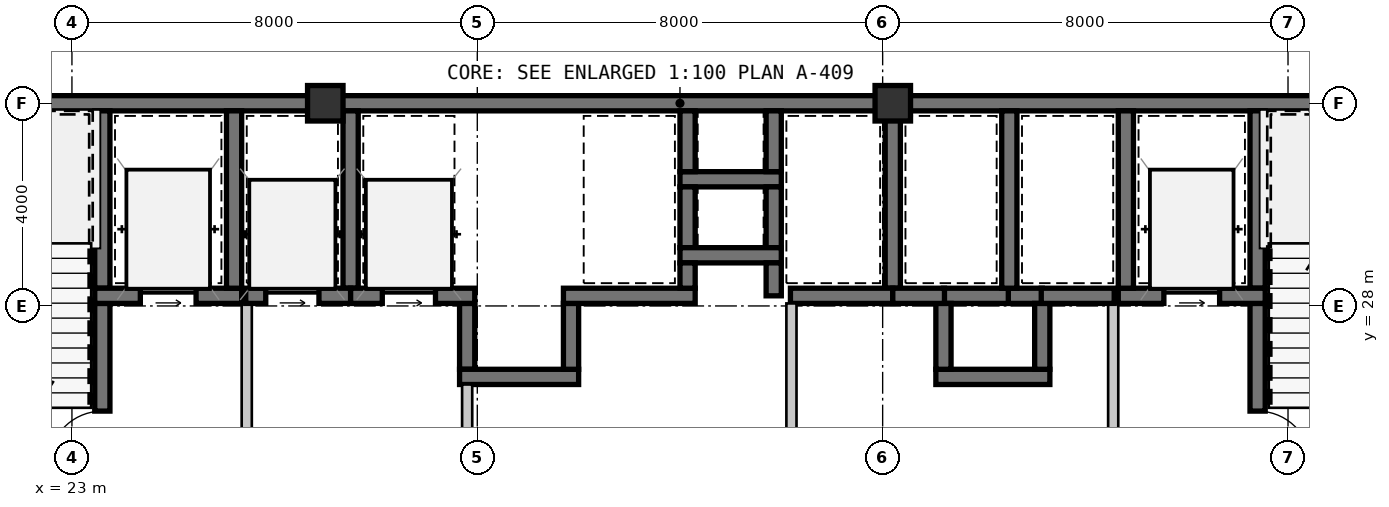
"""IFC4 building model, lengths in metres.
Left out: names, types, materials, properties, quantities, classifications, styles, units other than length and angle.
Written with IfcOpenShell. Run it as: python <this file> out.ifc"""

import sys

from ifc_helpers import new_model, si_unit, direction, frame, frame_2d, origin, origin_2d, place, context, subcontext, project, spatial, rectangle, extrude, source, transform, mapped, element, fill, save


model = new_model("IFC4")
c1 = context("Model", 3, precision=1e-05, world=origin(), true_north=direction((0.0, 1.0)))
c2 = subcontext(c1, "Body", "Model", "MODEL_VIEW")
j1 = project(units=[si_unit("LENGTHUNIT", "METRE"), si_unit("PLANEANGLEUNIT", "RADIAN")], contexts=[c1])
p1 = place(None, origin())
s1 = spatial("IfcSite", under=j1, at=p1, CompositionType="ELEMENT")
p2 = place(p1, origin())
s2 = spatial("IfcBuilding", under=s1, at=p2, CompositionType="ELEMENT")
p3 = place(p2, frame((0.0, 0.0, 68.25)))
s3 = spatial("IfcBuildingStorey", under=s2, at=p3, CompositionType="ELEMENT", Elevation=68.25)
m1 = source(origin(), c2, "Body", "SweptSolid", [
    extrude(rectangle(XDim=0.7, YDim=0.7, at=origin_2d()), origin(), (0.0, 0.0, 1.0), 3.15),
])
for number, where, z_axis, x_axis in (
    (1, (28.0, 32.0, 0.0), (0.0, 0.0, 1.0), (1.0, 0.0, 0.0)),
    (2, (39.2, 32.0, 0.0), (0.0, 0.0, 1.0), (1.0, 0.0, 0.0)),
):
    element("IfcColumn", number, at=place(p3, frame(where, z_axis=z_axis, x_axis=x_axis)), inside=s3, PredefinedType="COLUMN", context=c2, shape_type="MappedRepresentation", body=[
        mapped(m1, transform((0.0, 0.0, 0.0), scale=1.0)),
    ])
m2 = source(origin(), c2, "Body", "SweptSolid", [
    extrude(rectangle(XDim=9.15, YDim=0.3, at=frame_2d((4.575, 0.0))), origin(), (0.0, 0.0, 1.0), 2.93),
])
p4 = place(p3, frame((18.85, 32.0, 0.0), z_axis=(0.0, 0.0, 1.0), x_axis=(1.0, 0.0, 0.0)))
e3 = element("IfcWall", 3, at=p4, inside=s3, PredefinedType="SHEAR", context=c2, shape_type="MappedRepresentation", body=[
    mapped(m2, transform((0.0, 0.0, 0.0), scale=1.0)),
])
m3 = source(origin(), c2, "Body", "SweptSolid", [
    extrude(rectangle(XDim=11.2, YDim=0.3, at=frame_2d((5.6, 0.0))), origin(), (0.0, 0.0, 1.0), 2.93),
])
p5 = place(p3, frame((28.0, 32.0, 0.0), z_axis=(0.0, 0.0, 1.0), x_axis=(1.0, 0.0, 0.0)))
e4 = element("IfcWall", 4, at=p5, inside=s3, PredefinedType="SHEAR", context=c2, shape_type="MappedRepresentation", body=[
    mapped(m3, transform((0.0, 0.0, 0.0), scale=1.0)),
])
m4 = source(origin(), c2, "Body", "SweptSolid", [
    extrude(rectangle(XDim=11.95, YDim=0.3, at=frame_2d((5.975, 0.0))), origin(), (0.0, 0.0, 1.0), 2.93),
])
p6 = place(p3, frame((39.2, 32.0, 0.0), z_axis=(0.0, 0.0, 1.0), x_axis=(1.0, 0.0, 0.0)))
e5 = element("IfcWall", 5, at=p6, inside=s3, PredefinedType="SHEAR", context=c2, shape_type="MappedRepresentation", body=[
    mapped(m4, transform((0.0, 0.0, 0.0), scale=1.0)),
])
m5 = source(origin(), c2, "Body", "SweptSolid", [
    extrude(rectangle(XDim=3.5, YDim=0.3, at=frame_2d((1.75, 0.0))), origin(), (0.0, 0.0, 1.0), 2.93),
])
p7 = place(p3, frame((23.6, 28.35, 0.0), z_axis=(0.0, 0.0, 1.0), x_axis=(0.0, 1.0, 0.0)))
e6 = element("IfcWall", 6, at=p7, inside=s3, PredefinedType="SHEAR", context=c2, shape_type="MappedRepresentation", body=[
    mapped(m5, transform((0.0, 0.0, 0.0), scale=1.0)),
])
m6 = source(origin(), c2, "Body", "SweptSolid", [
    extrude(rectangle(XDim=3.9, YDim=0.3, at=frame_2d((1.95, 0.0))), origin(), (0.0, 0.0, 1.0), 2.93),
])
p8 = place(p3, frame((23.6, 24.15, 0.0), z_axis=(0.0, 0.0, 1.0), x_axis=(0.0, 1.0, 0.0)))
e7 = element("IfcWall", 7, at=p8, inside=s3, PredefinedType="SHEAR", context=c2, shape_type="MappedRepresentation", body=[
    mapped(m6, transform((0.0, 0.0, 0.0), scale=1.0)),
])
m7 = source(origin(), c2, "Body", "SweptSolid", [
    extrude(rectangle(XDim=1.05, YDim=2.1, at=frame_2d((0.525, 1.05))), frame((0.0, 0.16, 0.0), z_axis=(0.0, -1.0, 0.0), x_axis=(1.0, 0.0, 0.0)), (0.0, 0.0, 1.0), 0.32),
])
p9 = place(p8, frame((0.725, 0.0, 0.0)))
e8 = element("IfcOpeningElement", 8, at=p9, cuts=e7, PredefinedType="OPENING", context=c2, shape_type="MappedRepresentation", body=[
    mapped(m7, transform((0.0, 0.0, 0.0), scale=1.0)),
])
m8 = source(origin(), c2, "Body", "SweptSolid", [
    extrude(rectangle(XDim=2.9, YDim=0.3, at=frame_2d((1.45, 0.0))), origin(), (0.0, 0.0, 1.0), 2.93),
])
p10 = place(p3, frame((23.45, 28.2, 0.0), z_axis=(0.0, 0.0, 1.0), x_axis=(1.0, 0.0, 0.0)))
e9 = element("IfcWall", 9, at=p10, inside=s3, PredefinedType="SHEAR", context=c2, shape_type="MappedRepresentation", body=[
    mapped(m8, transform((0.0, 0.0, 0.0), scale=1.0)),
])
m9 = source(origin(), c2, "Body", "SweptSolid", [
    extrude(rectangle(XDim=1.1, YDim=2.15, at=frame_2d((0.55, 1.075))), frame((0.0, 0.16, 0.0), z_axis=(0.0, -1.0, 0.0), x_axis=(1.0, 0.0, 0.0)), (0.0, 0.0, 1.0), 0.32),
])
p11 = place(p10, frame((0.9, 0.0, 0.0)))
e10 = element("IfcOpeningElement", 10, at=p11, cuts=e9, PredefinedType="OPENING", context=c2, shape_type="MappedRepresentation", body=[
    mapped(m9, transform((0.0, 0.0, 0.0), scale=1.0)),
])
p12 = place(p3, frame((26.2, 28.35, 0.0), z_axis=(0.0, 0.0, 1.0), x_axis=(0.0, 1.0, 0.0)))
e11 = element("IfcWall", 11, at=p12, inside=s3, PredefinedType="SHEAR", context=c2, shape_type="MappedRepresentation", body=[
    mapped(m5, transform((0.0, 0.0, 0.0), scale=1.0)),
])
m10 = source(origin(), c2, "Body", "SweptSolid", [
    extrude(rectangle(XDim=3.95, YDim=0.2, at=frame_2d((1.975, 0.0))), origin(), (0.0, 0.0, 1.0), 2.93),
])
p13 = place(p3, frame((26.45, 24.1, 0.0), z_axis=(0.0, 0.0, 1.0), x_axis=(0.0, 1.0, 0.0)))
e12 = element("IfcWall", 12, at=p13, inside=s3, PredefinedType="SOLIDWALL", context=c2, shape_type="MappedRepresentation", body=[
    mapped(m10, transform((0.0, 0.0, 0.0), scale=1.0)),
])
p14 = place(p3, frame((46.4, 31.85, 0.0), z_axis=(0.0, 0.0, 1.0), x_axis=(0.0, -1.0, 0.0)))
e13 = element("IfcWall", 13, at=p14, inside=s3, PredefinedType="SHEAR", context=c2, shape_type="MappedRepresentation", body=[
    mapped(m5, transform((0.0, 0.0, 0.0), scale=1.0)),
])
p15 = place(p3, frame((46.4, 28.05, 0.0), z_axis=(0.0, 0.0, 1.0), x_axis=(0.0, -1.0, 0.0)))
e14 = element("IfcWall", 14, at=p15, inside=s3, PredefinedType="SHEAR", context=c2, shape_type="MappedRepresentation", body=[
    mapped(m6, transform((0.0, 0.0, 0.0), scale=1.0)),
])
p16 = place(p15, frame((2.125, 0.0, 0.0)))
e15 = element("IfcOpeningElement", 15, at=p16, cuts=e14, PredefinedType="OPENING", context=c2, shape_type="MappedRepresentation", body=[
    mapped(m7, transform((0.0, 0.0, 0.0), scale=1.0)),
])
p17 = place(p3, frame((43.65, 28.2, 0.0), z_axis=(0.0, 0.0, 1.0), x_axis=(1.0, 0.0, 0.0)))
e16 = element("IfcWall", 16, at=p17, inside=s3, PredefinedType="SHEAR", context=c2, shape_type="MappedRepresentation", body=[
    mapped(m8, transform((0.0, 0.0, 0.0), scale=1.0)),
])
p18 = place(p17, frame((0.9, 0.0, 0.0)))
e17 = element("IfcOpeningElement", 17, at=p18, cuts=e16, PredefinedType="OPENING", context=c2, shape_type="MappedRepresentation", body=[
    mapped(m9, transform((0.0, 0.0, 0.0), scale=1.0)),
])
p19 = place(p3, frame((43.8, 31.85, 0.0), z_axis=(0.0, 0.0, 1.0), x_axis=(0.0, -1.0, 0.0)))
e18 = element("IfcWall", 18, at=p19, inside=s3, PredefinedType="SHEAR", context=c2, shape_type="MappedRepresentation", body=[
    mapped(m5, transform((0.0, 0.0, 0.0), scale=1.0)),
])
p20 = place(p3, frame((43.55, 28.05, 0.0), z_axis=(0.0, 0.0, 1.0), x_axis=(0.0, -1.0, 0.0)))
e19 = element("IfcWall", 19, at=p20, inside=s3, PredefinedType="SOLIDWALL", context=c2, shape_type="MappedRepresentation", body=[
    mapped(m10, transform((0.0, 0.0, 0.0), scale=1.0)),
])
m11 = source(origin(), c2, "Body", "SweptSolid", [
    extrude(rectangle(XDim=2.0, YDim=0.3, at=frame_2d((1.0, 0.0))), origin(), (0.0, 0.0, 1.0), 2.93),
])
p21 = place(p3, frame((35.0, 30.5, 0.0), z_axis=(0.0, 0.0, 1.0), x_axis=(1.0, 0.0, 0.0)))
e20 = element("IfcWall", 20, at=p21, inside=s3, PredefinedType="SHEAR", context=c2, shape_type="MappedRepresentation", body=[
    mapped(m11, transform((0.0, 0.0, 0.0), scale=1.0)),
])
m12 = source(origin(), c2, "Body", "SweptSolid", [
    extrude(rectangle(XDim=1.2, YDim=0.3, at=frame_2d((0.6, 0.0))), origin(), (0.0, 0.0, 1.0), 2.93),
])
for number, where, z_axis, x_axis in (
    (21, (35.15, 31.85, 0.0), (0.0, 0.0, 1.0), (0.0, -1.0, 0.0)),
    (22, (36.85, 30.65, 0.0), (0.0, 0.0, 1.0), (0.0, 1.0, 0.0)),
    (23, (35.15, 30.35, 0.0), (0.0, 0.0, 1.0), (0.0, -1.0, 0.0)),
    (24, (36.85, 29.15, 0.0), (0.0, 0.0, 1.0), (0.0, 1.0, 0.0)),
):
    element("IfcWall", number, at=place(p3, frame(where, z_axis=z_axis, x_axis=x_axis)), inside=s3, PredefinedType="SHEAR", context=c2, shape_type="MappedRepresentation", body=[
        mapped(m12, transform((0.0, 0.0, 0.0), scale=1.0)),
    ])
p22 = place(p3, frame((35.0, 29.0, 0.0), z_axis=(0.0, 0.0, 1.0), x_axis=(1.0, 0.0, 0.0)))
e25 = element("IfcWall", 25, at=p22, inside=s3, PredefinedType="SHEAR", context=c2, shape_type="MappedRepresentation", body=[
    mapped(m11, transform((0.0, 0.0, 0.0), scale=1.0)),
])
m13 = source(origin(), c2, "Body", "SweptSolid", [
    extrude(rectangle(XDim=1.3, YDim=0.3, at=frame_2d((0.65, 0.0))), origin(), (0.0, 0.0, 1.0), 2.93),
])
p23 = place(p3, frame((30.8, 28.05, 0.0), z_axis=(0.0, 0.0, 1.0), x_axis=(0.0, -1.0, 0.0)))
e26 = element("IfcWall", 26, at=p23, inside=s3, PredefinedType="SHEAR", context=c2, shape_type="MappedRepresentation", body=[
    mapped(m13, transform((0.0, 0.0, 0.0), scale=1.0)),
])
m14 = source(origin(), c2, "Body", "SweptSolid", [
    extrude(rectangle(XDim=2.35, YDim=0.3, at=frame_2d((1.175, 0.0))), origin(), (0.0, 0.0, 1.0), 2.93),
])
p24 = place(p3, frame((30.65, 26.6, 0.0), z_axis=(0.0, 0.0, 1.0), x_axis=(1.0, 0.0, 0.0)))
e27 = element("IfcWall", 27, at=p24, inside=s3, PredefinedType="SHEAR", context=c2, shape_type="MappedRepresentation", body=[
    mapped(m14, transform((0.0, 0.0, 0.0), scale=1.0)),
])
p25 = place(p3, frame((32.85, 26.75, 0.0), z_axis=(0.0, 0.0, 1.0), x_axis=(0.0, 1.0, 0.0)))
e28 = element("IfcWall", 28, at=p25, inside=s3, PredefinedType="SHEAR", context=c2, shape_type="MappedRepresentation", body=[
    mapped(m13, transform((0.0, 0.0, 0.0), scale=1.0)),
])
m15 = source(origin(), c2, "Body", "SweptSolid", [
    extrude(rectangle(XDim=1.32, YDim=0.3, at=frame_2d((0.66, 0.0))), origin(), (0.0, 0.0, 1.0), 2.93),
])
p26 = place(p3, frame((41.52, 28.2, 0.0), z_axis=(0.0, 0.0, 1.0), x_axis=(-1.0, 0.0, 0.0)))
e29 = element("IfcWall", 29, at=p26, inside=s3, PredefinedType="SHEAR", context=c2, shape_type="MappedRepresentation", body=[
    mapped(m15, transform((0.0, 0.0, 0.0), scale=1.0)),
])
m16 = source(origin(), c2, "Body", "SweptSolid", [
    extrude(rectangle(XDim=0.67, YDim=0.3, at=frame_2d((0.335, 0.0))), origin(), (0.0, 0.0, 1.0), 2.93),
])
p27 = place(p3, frame((42.15, 28.2, 0.0), z_axis=(0.0, 0.0, 1.0), x_axis=(-1.0, 0.0, 0.0)))
e30 = element("IfcWall", 30, at=p27, inside=s3, PredefinedType="SHEAR", context=c2, shape_type="MappedRepresentation", body=[
    mapped(m16, transform((0.0, 0.0, 0.0), scale=1.0)),
])
m17 = source(origin(), c2, "Body", "SweptSolid", [
    extrude(rectangle(XDim=2.25, YDim=0.3, at=frame_2d((1.125, 0.0))), origin(), (0.0, 0.0, 1.0), 2.93),
])
p28 = place(p3, frame((40.05, 26.6, 0.0), z_axis=(0.0, 0.0, 1.0), x_axis=(1.0, 0.0, 0.0)))
e31 = element("IfcWall", 31, at=p28, inside=s3, PredefinedType="SHEAR", context=c2, shape_type="MappedRepresentation", body=[
    mapped(m17, transform((0.0, 0.0, 0.0), scale=1.0)),
])
for number, where, z_axis, x_axis in (
    (32, (40.2, 28.05, 0.0), (0.0, 0.0, 1.0), (0.0, -1.0, 0.0)),
    (33, (42.15, 26.75, 0.0), (0.0, 0.0, 1.0), (0.0, 1.0, 0.0)),
):
    element("IfcWall", number, at=place(p3, frame(where, z_axis=z_axis, x_axis=x_axis)), inside=s3, PredefinedType="SHEAR", context=c2, shape_type="MappedRepresentation", body=[
        mapped(m13, transform((0.0, 0.0, 0.0), scale=1.0)),
    ])
p29 = place(p3, frame((28.5, 28.35, 0.0), z_axis=(0.0, 0.0, 1.0), x_axis=(0.0, 1.0, 0.0)))
e34 = element("IfcWall", 34, at=p29, inside=s3, PredefinedType="SHEAR", context=c2, shape_type="MappedRepresentation", body=[
    mapped(m5, transform((0.0, 0.0, 0.0), scale=1.0)),
])
m18 = source(origin(), c2, "Body", "SweptSolid", [
    extrude(rectangle(XDim=2.07, YDim=0.3, at=frame_2d((1.035, 0.0))), origin(), (0.0, 0.0, 1.0), 2.93),
])
p30 = place(p3, frame((26.43, 28.2, 0.0), z_axis=(0.0, 0.0, 1.0), x_axis=(1.0, 0.0, 0.0)))
e35 = element("IfcWall", 35, at=p30, inside=s3, PredefinedType="SHEAR", context=c2, shape_type="MappedRepresentation", body=[
    mapped(m18, transform((0.0, 0.0, 0.0), scale=1.0)),
])
m19 = source(origin(), c2, "Body", "SweptSolid", [
    extrude(rectangle(XDim=1.05, YDim=2.15, at=frame_2d((0.525, 1.075))), frame((0.0, 0.16, 0.0), z_axis=(0.0, -1.0, 0.0), x_axis=(1.0, 0.0, 0.0)), (0.0, 0.0, 1.0), 0.32),
])
p31 = place(p30, frame((0.395, 0.0, 0.0)))
e36 = element("IfcOpeningElement", 36, at=p31, cuts=e35, PredefinedType="OPENING", context=c2, shape_type="MappedRepresentation", body=[
    mapped(m19, transform((0.0, 0.0, 0.0), scale=1.0)),
])
m20 = source(origin(), c2, "Body", "SweptSolid", [
    extrude(rectangle(XDim=2.45, YDim=0.3, at=frame_2d((1.225, 0.0))), origin(), (0.0, 0.0, 1.0), 2.93),
])
p32 = place(p3, frame((28.5, 28.2, 0.0), z_axis=(0.0, 0.0, 1.0), x_axis=(1.0, 0.0, 0.0)))
e37 = element("IfcWall", 37, at=p32, inside=s3, PredefinedType="SHEAR", context=c2, shape_type="MappedRepresentation", body=[
    mapped(m20, transform((0.0, 0.0, 0.0), scale=1.0)),
])
p33 = place(p32, frame((0.625, 0.0, 0.0)))
e38 = element("IfcOpeningElement", 38, at=p33, cuts=e37, PredefinedType="OPENING", context=c2, shape_type="MappedRepresentation", body=[
    mapped(m19, transform((0.0, 0.0, 0.0), scale=1.0)),
])
m21 = source(origin(), c2, "Body", "SweptSolid", [
    extrude(rectangle(XDim=2.35, YDim=0.2, at=frame_2d((1.175, 0.0))), origin(), (0.0, 0.0, 1.0), 2.93),
])
p34 = place(p3, frame((30.8, 26.45, 0.0), z_axis=(0.0, 0.0, 1.0), x_axis=(0.0, -1.0, 0.0)))
e39 = element("IfcWall", 39, at=p34, inside=s3, PredefinedType="SOLIDWALL", context=c2, shape_type="MappedRepresentation", body=[
    mapped(m21, transform((0.0, 0.0, 0.0), scale=1.0)),
])
m22 = source(origin(), c2, "Body", "SweptSolid", [
    extrude(rectangle(XDim=2.6, YDim=0.3, at=frame_2d((1.3, 0.0))), origin(), (0.0, 0.0, 1.0), 2.93),
])
p35 = place(p3, frame((32.7, 28.2, 0.0), z_axis=(0.0, 0.0, 1.0), x_axis=(1.0, 0.0, 0.0)))
e40 = element("IfcWall", 40, at=p35, inside=s3, PredefinedType="SHEAR", context=c2, shape_type="MappedRepresentation", body=[
    mapped(m22, transform((0.0, 0.0, 0.0), scale=1.0)),
])
m23 = source(origin(), c2, "Body", "SweptSolid", [
    extrude(rectangle(XDim=0.5, YDim=0.3, at=frame_2d((0.25, 0.0))), origin(), (0.0, 0.0, 1.0), 2.93),
])
p36 = place(p3, frame((35.15, 28.35, 0.0), z_axis=(0.0, 0.0, 1.0), x_axis=(0.0, 1.0, 0.0)))
e41 = element("IfcWall", 41, at=p36, inside=s3, PredefinedType="SHEAR", context=c2, shape_type="MappedRepresentation", body=[
    mapped(m23, transform((0.0, 0.0, 0.0), scale=1.0)),
])
p37 = place(p3, frame((39.2, 28.35, 0.0), z_axis=(0.0, 0.0, 1.0), x_axis=(0.0, 1.0, 0.0)))
e42 = element("IfcWall", 42, at=p37, inside=s3, PredefinedType="SHEAR", context=c2, shape_type="MappedRepresentation", body=[
    mapped(m5, transform((0.0, 0.0, 0.0), scale=1.0)),
])
m24 = source(origin(), c2, "Body", "SweptSolid", [
    extrude(rectangle(XDim=0.65, YDim=0.3, at=frame_2d((0.325, 0.0))), origin(), (0.0, 0.0, 1.0), 2.93),
])
p38 = place(p3, frame((36.85, 28.85, 0.0), z_axis=(0.0, 0.0, 1.0), x_axis=(0.0, -1.0, 0.0)))
e43 = element("IfcWall", 43, at=p38, inside=s3, PredefinedType="SHEAR", context=c2, shape_type="MappedRepresentation", body=[
    mapped(m24, transform((0.0, 0.0, 0.0), scale=1.0)),
])
m25 = source(origin(), c2, "Body", "SweptSolid", [
    extrude(rectangle(XDim=2.02, YDim=0.3, at=frame_2d((1.01, 0.0))), origin(), (0.0, 0.0, 1.0), 2.93),
])
p39 = place(p3, frame((37.18, 28.2, 0.0), z_axis=(0.0, 0.0, 1.0), x_axis=(1.0, 0.0, 0.0)))
e44 = element("IfcWall", 44, at=p39, inside=s3, PredefinedType="SHEAR", context=c2, shape_type="MappedRepresentation", body=[
    mapped(m25, transform((0.0, 0.0, 0.0), scale=1.0)),
])
p40 = place(p3, frame((41.5, 28.35, 0.0), z_axis=(0.0, 0.0, 1.0), x_axis=(0.0, 1.0, 0.0)))
e45 = element("IfcWall", 45, at=p40, inside=s3, PredefinedType="SHEAR", context=c2, shape_type="MappedRepresentation", body=[
    mapped(m5, transform((0.0, 0.0, 0.0), scale=1.0)),
])
m26 = source(origin(), c2, "Body", "SweptSolid", [
    extrude(rectangle(XDim=1.02, YDim=0.3, at=frame_2d((0.51, 0.0))), origin(), (0.0, 0.0, 1.0), 2.93),
])
p41 = place(p3, frame((39.2, 28.2, 0.0), z_axis=(0.0, 0.0, 1.0), x_axis=(1.0, 0.0, 0.0)))
e46 = element("IfcWall", 46, at=p41, inside=s3, PredefinedType="SHEAR", context=c2, shape_type="MappedRepresentation", body=[
    mapped(m26, transform((0.0, 0.0, 0.0), scale=1.0)),
])
m27 = source(origin(), c2, "Body", "SweptSolid", [
    extrude(rectangle(XDim=1.44, YDim=0.3, at=frame_2d((0.72, 0.0))), origin(), (0.0, 0.0, 1.0), 2.93),
])
p42 = place(p3, frame((42.13, 28.2, 0.0), z_axis=(0.0, 0.0, 1.0), x_axis=(1.0, 0.0, 0.0)))
e47 = element("IfcWall", 47, at=p42, inside=s3, PredefinedType="SHEAR", context=c2, shape_type="MappedRepresentation", body=[
    mapped(m27, transform((0.0, 0.0, 0.0), scale=1.0)),
])
p43 = place(p3, frame((37.2, 28.05, 0.0), z_axis=(0.0, 0.0, 1.0), x_axis=(0.0, -1.0, 0.0)))
e48 = element("IfcWall", 48, at=p43, inside=s3, PredefinedType="SOLIDWALL", context=c2, shape_type="MappedRepresentation", body=[
    mapped(m10, transform((0.0, 0.0, 0.0), scale=1.0)),
])
m28 = source(origin(), c2, "Body", "SweptSolid", [
    extrude(rectangle(XDim=1.05, YDim=2.1, at=frame_2d((0.525, 1.05))), frame((0.0, 0.025, 0.0), z_axis=(0.0, -1.0, 0.0), x_axis=(1.0, 0.0, 0.0)), (0.0, 0.0, 1.0), 0.05),
])
p44 = place(p9, origin())
e49 = element("IfcDoor", 49, at=p44, inside=s3, OperationType="SINGLE_SWING_LEFT", PredefinedType="DOOR", context=c2, shape_type="MappedRepresentation", body=[
    mapped(m28, transform((0.0, 0.0, 0.0), scale=1.0)),
])
fill(e8, e49)
m29 = source(origin(), c2, "Body", "SweptSolid", [
    extrude(rectangle(XDim=1.1, YDim=2.15, at=frame_2d((0.55, 1.075))), frame((0.0, 0.025, 0.0), z_axis=(0.0, -1.0, 0.0), x_axis=(1.0, 0.0, 0.0)), (0.0, 0.0, 1.0), 0.05),
])
p45 = place(p11, origin())
e50 = element("IfcDoor", 50, at=p45, inside=s3, OperationType="SLIDING_TO_LEFT", PredefinedType="DOOR", context=c2, shape_type="MappedRepresentation", body=[
    mapped(m29, transform((0.0, 0.0, 0.0), scale=1.0)),
])
fill(e10, e50)
p46 = place(p16, origin())
e51 = element("IfcDoor", 51, at=p46, inside=s3, OperationType="SINGLE_SWING_RIGHT", PredefinedType="DOOR", context=c2, shape_type="MappedRepresentation", body=[
    mapped(m28, transform((0.0, 0.0, 0.0), scale=1.0)),
])
fill(e15, e51)
p47 = place(p18, origin())
e52 = element("IfcDoor", 52, at=p47, inside=s3, OperationType="SLIDING_TO_LEFT", PredefinedType="DOOR", context=c2, shape_type="MappedRepresentation", body=[
    mapped(m29, transform((0.0, 0.0, 0.0), scale=1.0)),
])
fill(e17, e52)
m30 = source(origin(), c2, "Body", "SweptSolid", [
    extrude(rectangle(XDim=1.05, YDim=2.15, at=frame_2d((0.525, 1.075))), frame((0.0, 0.025, 0.0), z_axis=(0.0, -1.0, 0.0), x_axis=(1.0, 0.0, 0.0)), (0.0, 0.0, 1.0), 0.05),
])
p48 = place(p31, origin())
e53 = element("IfcDoor", 53, at=p48, inside=s3, OperationType="SLIDING_TO_LEFT", PredefinedType="DOOR", context=c2, shape_type="MappedRepresentation", body=[
    mapped(m30, transform((0.0, 0.0, 0.0), scale=1.0)),
])
fill(e36, e53)
p49 = place(p33, origin())
e54 = element("IfcDoor", 54, at=p49, inside=s3, OperationType="SLIDING_TO_LEFT", PredefinedType="DOOR", context=c2, shape_type="MappedRepresentation", body=[
    mapped(m30, transform((0.0, 0.0, 0.0), scale=1.0)),
])
fill(e38, e54)
save(model, sys.argv[1])
